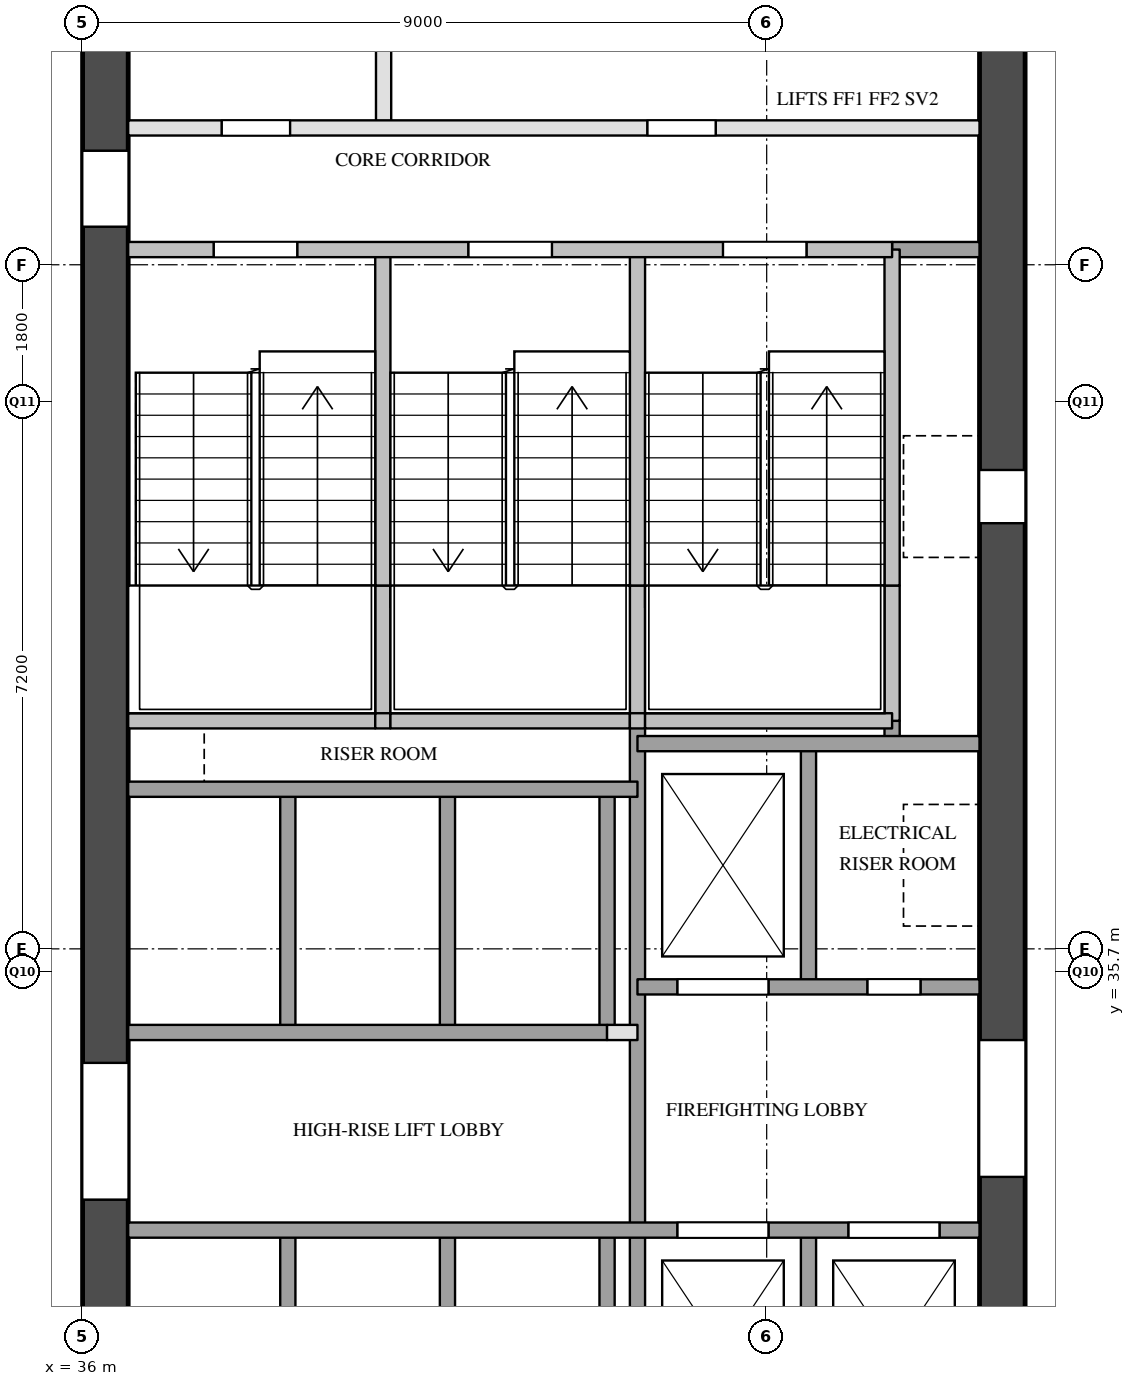
"""IFC4 building model, lengths in metres.
Left out: names, types, materials, properties, quantities, classifications, styles, units other than length and angle.
Written with IfcOpenShell. Run it as: python <this file> out.ifc"""

import sys

from ifc_helpers import new_model, si_unit, direction, frame, frame_2d, origin, place, context, subcontext, project, spatial, rectangle, extrude, element, fill, save


model = new_model("IFC4")
c1 = context("Model", 3, precision=1e-05, world=origin(), true_north=direction((0.0, 1.0)))
c2 = subcontext(c1, "Body", "Model", "MODEL_VIEW")
j1 = project(units=[si_unit("LENGTHUNIT", "METRE"), si_unit("PLANEANGLEUNIT", "RADIAN")], contexts=[c1])
p1 = place(None, origin())
s1 = spatial("IfcSite", under=j1, at=p1, CompositionType="ELEMENT")
p2 = place(p1, origin())
s2 = spatial("IfcBuilding", under=s1, at=p2, CompositionType="ELEMENT")
p3 = place(p2, frame((0.0, 0.0, 38.6)))
s3 = spatial("IfcBuildingStorey", under=s2, at=p3, CompositionType="ELEMENT", Elevation=38.6)
p4 = place(p3, frame((36.3, 29.1, 0.0), z_axis=(0.0, 0.0, 1.0), x_axis=(0.0, 1.0, 0.0)))
e1 = element("IfcWall", 1, at=p4, inside=s3, PredefinedType="SHEAR", context=c2, shape_type="SweptSolid", body=[
    extrude(rectangle(XDim=20.3, YDim=0.6, at=frame_2d((10.15, 0.0))), origin(), (0.0, 0.0, 1.0), 3.5),
])
p5 = place(p4, frame((3.6, 0.0, 0.0)))
e2 = element("IfcOpeningElement", 2, at=p5, cuts=e1, PredefinedType="OPENING", context=c2, shape_type="SweptSolid", body=[
    extrude(rectangle(XDim=1.8, YDim=2.1, at=frame_2d((0.9, 1.05))), frame((0.0, 0.31, 0.0), z_axis=(0.0, -1.0, 0.0), x_axis=(1.0, 0.0, 0.0)), (0.0, 0.0, 1.0), 0.62),
])
p6 = place(p4, frame((16.4, 0.0, 0.0)))
e3 = element("IfcOpeningElement", 3, at=p6, cuts=e1, PredefinedType="OPENING", context=c2, shape_type="SweptSolid", body=[
    extrude(rectangle(XDim=1.0, YDim=2.1, at=frame_2d((0.5, 1.05))), frame((0.0, 0.31, 0.0), z_axis=(0.0, -1.0, 0.0), x_axis=(1.0, 0.0, 0.0)), (0.0, 0.0, 1.0), 0.62),
])
p7 = place(p3, frame((48.1, 29.1, 0.0), z_axis=(0.0, 0.0, 1.0), x_axis=(0.0, 1.0, 0.0)))
e4 = element("IfcWall", 4, at=p7, inside=s3, PredefinedType="SHEAR", context=c2, shape_type="SweptSolid", body=[
    extrude(rectangle(XDim=20.3, YDim=0.6, at=frame_2d((10.15, 0.0))), origin(), (0.0, 0.0, 1.0), 3.5),
])
p8 = place(p7, frame((12.5, 0.0, 0.0)))
e5 = element("IfcOpeningElement", 5, at=p8, cuts=e4, PredefinedType="OPENING", context=c2, shape_type="SweptSolid", body=[
    extrude(rectangle(XDim=0.7, YDim=2.1, at=frame_2d((0.35, 1.05))), frame((0.0, 0.31, 0.0), z_axis=(0.0, -1.0, 0.0), x_axis=(1.0, 0.0, 0.0)), (0.0, 0.0, 1.0), 0.62),
])
p9 = place(p7, frame((3.9, 0.0, 0.0)))
e6 = element("IfcOpeningElement", 6, at=p9, cuts=e4, PredefinedType="OPENING", context=c2, shape_type="SweptSolid", body=[
    extrude(rectangle(XDim=1.8, YDim=2.1, at=frame_2d((0.9, 1.05))), frame((0.0, 0.31, 0.0), z_axis=(0.0, -1.0, 0.0), x_axis=(1.0, 0.0, 0.0)), (0.0, 0.0, 1.0), 0.62),
])
p10 = place(p3, frame((38.7, 29.1, 0.0), z_axis=(0.0, 0.0, 1.0), x_axis=(0.0, 1.0, 0.0)))
e7 = element("IfcWall", 7, at=p10, inside=s3, PredefinedType="SOLIDWALL", context=c2, shape_type="SweptSolid", body=[
    extrude(rectangle(XDim=3.2, YDim=0.2, at=frame_2d((1.6, 0.0))), origin(), (0.0, 0.0, 1.0), 3.5),
])
p11 = place(p3, frame((38.7, 34.9, 0.0), z_axis=(0.0, 0.0, 1.0), x_axis=(0.0, 1.0, 0.0)))
e8 = element("IfcWall", 8, at=p11, inside=s3, PredefinedType="SOLIDWALL", context=c2, shape_type="SweptSolid", body=[
    extrude(rectangle(XDim=3.2, YDim=0.2, at=frame_2d((1.6, 0.0))), origin(), (0.0, 0.0, 1.0), 3.5),
])
p12 = place(p3, frame((39.95, 39.0, 0.0), z_axis=(0.0, 0.0, 1.0), x_axis=(0.0, 1.0, 0.0)))
e9 = element("IfcWall", 9, at=p12, inside=s3, PredefinedType="SOLIDWALL", context=c2, shape_type="SweptSolid", body=[
    extrude(rectangle(XDim=1.78, YDim=0.2, at=frame_2d((0.89, 0.0))), origin(), (0.0, 0.0, 1.0), 3.5),
])
p13 = place(p3, frame((39.95, 40.78, 0.0), z_axis=(0.0, 0.0, 1.0), x_axis=(0.0, 1.0, 0.0)))
e10 = element("IfcWall", 10, at=p13, inside=s3, PredefinedType="SOLIDWALL", context=c2, shape_type="SweptSolid", body=[
    extrude(rectangle(XDim=4.42, YDim=0.2, at=frame_2d((2.21, 0.0))), origin(), (0.0, 0.0, 1.0), 3.5),
])
p14 = place(p3, frame((39.96, 46.8, 0.0), z_axis=(0.0, 0.0, 1.0), x_axis=(0.0, 1.0, 0.0)))
e11 = element("IfcWall", 11, at=p14, inside=s3, PredefinedType="PARTITIONING", context=c2, shape_type="SweptSolid", body=[
    extrude(rectangle(XDim=2.2, YDim=0.2, at=frame_2d((1.1, 0.0))), origin(), (0.0, 0.0, 1.0), 3.5),
])
p15 = place(p3, frame((40.8, 29.1, 0.0), z_axis=(0.0, 0.0, 1.0), x_axis=(0.0, 1.0, 0.0)))
e12 = element("IfcWall", 12, at=p15, inside=s3, PredefinedType="SOLIDWALL", context=c2, shape_type="SweptSolid", body=[
    extrude(rectangle(XDim=3.2, YDim=0.2, at=frame_2d((1.6, 0.0))), origin(), (0.0, 0.0, 1.0), 3.5),
])
p16 = place(p3, frame((40.8, 34.9, 0.0), z_axis=(0.0, 0.0, 1.0), x_axis=(0.0, 1.0, 0.0)))
e13 = element("IfcWall", 13, at=p16, inside=s3, PredefinedType="SOLIDWALL", context=c2, shape_type="SweptSolid", body=[
    extrude(rectangle(XDim=3.2, YDim=0.2, at=frame_2d((1.6, 0.0))), origin(), (0.0, 0.0, 1.0), 3.5),
])
p17 = place(p3, frame((42.9, 29.1, 0.0), z_axis=(0.0, 0.0, 1.0), x_axis=(0.0, 1.0, 0.0)))
e14 = element("IfcWall", 14, at=p17, inside=s3, PredefinedType="SOLIDWALL", context=c2, shape_type="SweptSolid", body=[
    extrude(rectangle(XDim=3.2, YDim=0.2, at=frame_2d((1.6, 0.0))), origin(), (0.0, 0.0, 1.0), 3.5),
])
p18 = place(p3, frame((42.9, 34.9, 0.0), z_axis=(0.0, 0.0, 1.0), x_axis=(0.0, 1.0, 0.0)))
e15 = element("IfcWall", 15, at=p18, inside=s3, PredefinedType="SOLIDWALL", context=c2, shape_type="SweptSolid", body=[
    extrude(rectangle(XDim=3.2, YDim=0.2, at=frame_2d((1.6, 0.0))), origin(), (0.0, 0.0, 1.0), 3.5),
])
p19 = place(p3, frame((43.3, 29.1, 0.0), z_axis=(0.0, 0.0, 1.0), x_axis=(0.0, 1.0, 0.0)))
e16 = element("IfcWall", 16, at=p19, inside=s3, PredefinedType="SOLIDWALL", context=c2, shape_type="SweptSolid", body=[
    extrude(rectangle(XDim=9.9, YDim=0.2, at=frame_2d((4.95, 0.0))), origin(), (0.0, 0.0, 1.0), 3.5),
])
p20 = place(p3, frame((43.3, 39.0, 0.0), z_axis=(0.0, 0.0, 1.0), x_axis=(0.0, 1.0, 0.0)))
e17 = element("IfcWall", 17, at=p20, inside=s3, PredefinedType="SOLIDWALL", context=c2, shape_type="SweptSolid", body=[
    extrude(rectangle(XDim=1.78, YDim=0.2, at=frame_2d((0.89, 0.0))), origin(), (0.0, 0.0, 1.0), 3.5),
])
p21 = place(p3, frame((43.3, 40.78, 0.0), z_axis=(0.0, 0.0, 1.0), x_axis=(0.0, 1.0, 0.0)))
e18 = element("IfcWall", 18, at=p21, inside=s3, PredefinedType="SOLIDWALL", context=c2, shape_type="SweptSolid", body=[
    extrude(rectangle(XDim=4.42, YDim=0.2, at=frame_2d((2.21, 0.0))), origin(), (0.0, 0.0, 1.0), 3.5),
])
for number, where, z_axis, x_axis in (
    (19, (45.55, 29.1, 0.0), (0.0, 0.0, 1.0), (0.0, 1.0, 0.0)),
    (20, (45.55, 35.5, 0.0), (0.0, 0.0, 1.0), (0.0, 1.0, 0.0)),
):
    element("IfcWall", number, at=place(p3, frame(where, z_axis=z_axis, x_axis=x_axis)), inside=s3, PredefinedType="SOLIDWALL", context=c2, shape_type="SweptSolid", body=[
        extrude(rectangle(XDim=3.2, YDim=0.2, at=frame_2d((1.6, 0.0))), origin(), (0.0, 0.0, 1.0), 3.5),
    ])
p22 = place(p3, frame((46.65, 38.7, 0.0), z_axis=(0.0, 0.0, 1.0), x_axis=(0.0, 1.0, 0.0)))
e21 = element("IfcWall", 21, at=p22, inside=s3, PredefinedType="SOLIDWALL", context=c2, shape_type="SweptSolid", body=[
    extrude(rectangle(XDim=0.3, YDim=0.2, at=frame_2d((0.15, 0.0))), origin(), (0.0, 0.0, 1.0), 3.5),
])
p23 = place(p3, frame((46.65, 39.0, 0.0), z_axis=(0.0, 0.0, 1.0), x_axis=(0.0, 1.0, 0.0)))
e22 = element("IfcWall", 22, at=p23, inside=s3, PredefinedType="SOLIDWALL", context=c2, shape_type="SweptSolid", body=[
    extrude(rectangle(XDim=1.78, YDim=0.2, at=frame_2d((0.89, 0.0))), origin(), (0.0, 0.0, 1.0), 3.5),
])
p24 = place(p3, frame((46.65, 40.78, 0.0), z_axis=(0.0, 0.0, 1.0), x_axis=(0.0, 1.0, 0.0)))
e23 = element("IfcWall", 23, at=p24, inside=s3, PredefinedType="SOLIDWALL", context=c2, shape_type="SweptSolid", body=[
    extrude(rectangle(XDim=4.42, YDim=0.2, at=frame_2d((2.21, 0.0))), origin(), (0.0, 0.0, 1.0), 3.5),
])
p25 = place(p3, frame((36.6, 32.3, 0.0), z_axis=(0.0, 0.0, 1.0), x_axis=(1.0, 0.0, 0.0)))
e24 = element("IfcWall", 24, at=p25, inside=s3, PredefinedType="SOLIDWALL", context=c2, shape_type="SweptSolid", body=[
    extrude(rectangle(XDim=11.2, YDim=0.2, at=frame_2d((5.6, 0.0))), origin(), (0.0, 0.0, 1.0), 3.5),
])
p26 = place(p25, frame((7.225, 0.0, 0.0)))
e25 = element("IfcOpeningElement", 25, at=p26, cuts=e24, PredefinedType="OPENING", context=c2, shape_type="SweptSolid", body=[
    extrude(rectangle(XDim=1.2, YDim=2.1, at=frame_2d((0.6, 1.05))), frame((0.0, 0.11, 0.0), z_axis=(0.0, -1.0, 0.0), x_axis=(1.0, 0.0, 0.0)), (0.0, 0.0, 1.0), 0.22),
])
p27 = place(p25, frame((9.475, 0.0, 0.0)))
e26 = element("IfcOpeningElement", 26, at=p27, cuts=e24, PredefinedType="OPENING", context=c2, shape_type="SweptSolid", body=[
    extrude(rectangle(XDim=1.2, YDim=2.1, at=frame_2d((0.6, 1.05))), frame((0.0, 0.11, 0.0), z_axis=(0.0, -1.0, 0.0), x_axis=(1.0, 0.0, 0.0)), (0.0, 0.0, 1.0), 0.22),
])
p28 = place(p3, frame((42.9, 34.9, 0.0), z_axis=(0.0, 0.0, 1.0), x_axis=(1.0, 0.0, 0.0)))
e27 = element("IfcWall", 27, at=p28, inside=s3, PredefinedType="PARTITIONING", context=c2, shape_type="SweptSolid", body=[
    extrude(rectangle(XDim=0.4, YDim=0.2, at=frame_2d((0.2, 0.0))), origin(), (0.0, 0.0, 1.0), 3.5),
])
p29 = place(p3, frame((36.6, 34.9, 0.0), z_axis=(0.0, 0.0, 1.0), x_axis=(1.0, 0.0, 0.0)))
e28 = element("IfcWall", 28, at=p29, inside=s3, PredefinedType="SOLIDWALL", context=c2, shape_type="SweptSolid", body=[
    extrude(rectangle(XDim=6.3, YDim=0.2, at=frame_2d((3.15, 0.0))), origin(), (0.0, 0.0, 1.0), 3.5),
])
p30 = place(p3, frame((43.3, 35.5, 0.0), z_axis=(0.0, 0.0, 1.0), x_axis=(1.0, 0.0, 0.0)))
e29 = element("IfcWall", 29, at=p30, inside=s3, PredefinedType="SOLIDWALL", context=c2, shape_type="SweptSolid", body=[
    extrude(rectangle(XDim=4.5, YDim=0.2, at=frame_2d((2.25, 0.0))), origin(), (0.0, 0.0, 1.0), 3.5),
])
p31 = place(p30, frame((0.525, 0.0, 0.0)))
e30 = element("IfcOpeningElement", 30, at=p31, cuts=e29, PredefinedType="OPENING", context=c2, shape_type="SweptSolid", body=[
    extrude(rectangle(XDim=1.2, YDim=2.1, at=frame_2d((0.6, 1.05))), frame((0.0, 0.11, 0.0), z_axis=(0.0, -1.0, 0.0), x_axis=(1.0, 0.0, 0.0)), (0.0, 0.0, 1.0), 0.22),
])
p32 = place(p30, frame((3.025, 0.0, 0.0)))
e31 = element("IfcOpeningElement", 31, at=p32, cuts=e29, PredefinedType="OPENING", context=c2, shape_type="SweptSolid", body=[
    extrude(rectangle(XDim=0.7, YDim=2.1, at=frame_2d((0.35, 1.05))), frame((0.0, 0.11, 0.0), z_axis=(0.0, -1.0, 0.0), x_axis=(1.0, 0.0, 0.0)), (0.0, 0.0, 1.0), 0.22),
])
p33 = place(p3, frame((36.6, 38.1, 0.0), z_axis=(0.0, 0.0, 1.0), x_axis=(1.0, 0.0, 0.0)))
e32 = element("IfcWall", 32, at=p33, inside=s3, PredefinedType="SOLIDWALL", context=c2, shape_type="SweptSolid", body=[
    extrude(rectangle(XDim=6.7, YDim=0.2, at=frame_2d((3.35, 0.0))), origin(), (0.0, 0.0, 1.0), 3.5),
])
p34 = place(p3, frame((43.3, 38.7, 0.0), z_axis=(0.0, 0.0, 1.0), x_axis=(1.0, 0.0, 0.0)))
e33 = element("IfcWall", 33, at=p34, inside=s3, PredefinedType="SOLIDWALL", context=c2, shape_type="SweptSolid", body=[
    extrude(rectangle(XDim=4.5, YDim=0.2, at=frame_2d((2.25, 0.0))), origin(), (0.0, 0.0, 1.0), 3.5),
])
p35 = place(p3, frame((36.6, 39.0, 0.0), z_axis=(0.0, 0.0, 1.0), x_axis=(1.0, 0.0, 0.0)))
e34 = element("IfcWall", 34, at=p35, inside=s3, PredefinedType="SOLIDWALL", context=c2, shape_type="SweptSolid", body=[
    extrude(rectangle(XDim=3.25, YDim=0.2, at=frame_2d((1.625, 0.0))), origin(), (0.0, 0.0, 1.0), 3.5),
])
p36 = place(p3, frame((39.85, 39.0, 0.0), z_axis=(0.0, 0.0, 1.0), x_axis=(1.0, 0.0, 0.0)))
e35 = element("IfcWall", 35, at=p36, inside=s3, PredefinedType="SOLIDWALL", context=c2, shape_type="SweptSolid", body=[
    extrude(rectangle(XDim=0.2, YDim=0.2, at=frame_2d((0.1, 0.0))), origin(), (0.0, 0.0, 1.0), 3.5),
])
p37 = place(p3, frame((40.05, 39.0, 0.0), z_axis=(0.0, 0.0, 1.0), x_axis=(1.0, 0.0, 0.0)))
e36 = element("IfcWall", 36, at=p37, inside=s3, PredefinedType="SOLIDWALL", context=c2, shape_type="SweptSolid", body=[
    extrude(rectangle(XDim=3.15, YDim=0.2, at=frame_2d((1.575, 0.0))), origin(), (0.0, 0.0, 1.0), 3.5),
])
p38 = place(p3, frame((43.2, 39.0, 0.0), z_axis=(0.0, 0.0, 1.0), x_axis=(1.0, 0.0, 0.0)))
e37 = element("IfcWall", 37, at=p38, inside=s3, PredefinedType="SOLIDWALL", context=c2, shape_type="SweptSolid", body=[
    extrude(rectangle(XDim=0.2, YDim=0.2, at=frame_2d((0.1, 0.0))), origin(), (0.0, 0.0, 1.0), 3.5),
])
p39 = place(p3, frame((43.4, 39.0, 0.0), z_axis=(0.0, 0.0, 1.0), x_axis=(1.0, 0.0, 0.0)))
e38 = element("IfcWall", 38, at=p39, inside=s3, PredefinedType="SOLIDWALL", context=c2, shape_type="SweptSolid", body=[
    extrude(rectangle(XDim=3.25, YDim=0.2, at=frame_2d((1.625, 0.0))), origin(), (0.0, 0.0, 1.0), 3.5),
])
p40 = place(p3, frame((46.65, 45.2, 0.0), z_axis=(0.0, 0.0, 1.0), x_axis=(1.0, 0.0, 0.0)))
e39 = element("IfcWall", 39, at=p40, inside=s3, PredefinedType="SOLIDWALL", context=c2, shape_type="SweptSolid", body=[
    extrude(rectangle(XDim=1.15, YDim=0.2, at=frame_2d((0.575, 0.0))), origin(), (0.0, 0.0, 1.0), 3.5),
])
p41 = place(p3, frame((36.6, 45.2, 0.0), z_axis=(0.0, 0.0, 1.0), x_axis=(1.0, 0.0, 0.0)))
e40 = element("IfcWall", 40, at=p41, inside=s3, PredefinedType="SOLIDWALL", context=c2, shape_type="SweptSolid", body=[
    extrude(rectangle(XDim=10.05, YDim=0.2, at=frame_2d((5.025, 0.0))), origin(), (0.0, 0.0, 1.0), 3.5),
])
p42 = place(p41, frame((1.125, 0.0, 0.0)))
e41 = element("IfcOpeningElement", 41, at=p42, cuts=e40, PredefinedType="OPENING", context=c2, shape_type="SweptSolid", body=[
    extrude(rectangle(XDim=1.1, YDim=2.1, at=frame_2d((0.55, 1.05))), frame((0.0, 0.11, 0.0), z_axis=(0.0, -1.0, 0.0), x_axis=(1.0, 0.0, 0.0)), (0.0, 0.0, 1.0), 0.22),
])
p43 = place(p41, frame((4.475, 0.0, 0.0)))
e42 = element("IfcOpeningElement", 42, at=p43, cuts=e40, PredefinedType="OPENING", context=c2, shape_type="SweptSolid", body=[
    extrude(rectangle(XDim=1.1, YDim=2.1, at=frame_2d((0.55, 1.05))), frame((0.0, 0.11, 0.0), z_axis=(0.0, -1.0, 0.0), x_axis=(1.0, 0.0, 0.0)), (0.0, 0.0, 1.0), 0.22),
])
p44 = place(p41, frame((7.825, 0.0, 0.0)))
e43 = element("IfcOpeningElement", 43, at=p44, cuts=e40, PredefinedType="OPENING", context=c2, shape_type="SweptSolid", body=[
    extrude(rectangle(XDim=1.1, YDim=2.1, at=frame_2d((0.55, 1.05))), frame((0.0, 0.11, 0.0), z_axis=(0.0, -1.0, 0.0), x_axis=(1.0, 0.0, 0.0)), (0.0, 0.0, 1.0), 0.22),
])
p45 = place(p3, frame((36.6, 46.8, 0.0), z_axis=(0.0, 0.0, 1.0), x_axis=(1.0, 0.0, 0.0)))
e44 = element("IfcWall", 44, at=p45, inside=s3, PredefinedType="PARTITIONING", context=c2, shape_type="SweptSolid", body=[
    extrude(rectangle(XDim=11.2, YDim=0.2, at=frame_2d((5.6, 0.0))), origin(), (0.0, 0.0, 1.0), 3.5),
])
p46 = place(p45, frame((1.23, 0.0, 0.0)))
e45 = element("IfcOpeningElement", 45, at=p46, cuts=e44, PredefinedType="OPENING", context=c2, shape_type="SweptSolid", body=[
    extrude(rectangle(XDim=0.9, YDim=2.1, at=frame_2d((0.45, 1.05))), frame((0.0, 0.11, 0.0), z_axis=(0.0, -1.0, 0.0), x_axis=(1.0, 0.0, 0.0)), (0.0, 0.0, 1.0), 0.22),
])
p47 = place(p45, frame((6.83, 0.0, 0.0)))
e46 = element("IfcOpeningElement", 46, at=p47, cuts=e44, PredefinedType="OPENING", context=c2, shape_type="SweptSolid", body=[
    extrude(rectangle(XDim=0.9, YDim=2.1, at=frame_2d((0.45, 1.05))), frame((0.0, 0.11, 0.0), z_axis=(0.0, -1.0, 0.0), x_axis=(1.0, 0.0, 0.0)), (0.0, 0.0, 1.0), 0.22),
])
p48 = place(p26, origin())
e47 = element("IfcDoor", 47, at=p48, inside=s3, OperationType="SLIDING_TO_LEFT", PredefinedType="DOOR", context=c2, shape_type="SweptSolid", body=[
    extrude(rectangle(XDim=1.2, YDim=2.1, at=frame_2d((0.6, 1.05))), frame((0.0, 0.025, 0.0), z_axis=(0.0, -1.0, 0.0), x_axis=(1.0, 0.0, 0.0)), (0.0, 0.0, 1.0), 0.05),
])
fill(e25, e47)
p49 = place(p27, origin())
e48 = element("IfcDoor", 48, at=p49, inside=s3, OperationType="SLIDING_TO_LEFT", PredefinedType="DOOR", context=c2, shape_type="SweptSolid", body=[
    extrude(rectangle(XDim=1.2, YDim=2.1, at=frame_2d((0.6, 1.05))), frame((0.0, 0.025, 0.0), z_axis=(0.0, -1.0, 0.0), x_axis=(1.0, 0.0, 0.0)), (0.0, 0.0, 1.0), 0.05),
])
fill(e26, e48)
p50 = place(p31, origin())
e49 = element("IfcDoor", 49, at=p50, inside=s3, OperationType="SLIDING_TO_LEFT", PredefinedType="DOOR", context=c2, shape_type="SweptSolid", body=[
    extrude(rectangle(XDim=1.2, YDim=2.1, at=frame_2d((0.6, 1.05))), frame((0.0, 0.025, 0.0), z_axis=(0.0, -1.0, 0.0), x_axis=(1.0, 0.0, 0.0)), (0.0, 0.0, 1.0), 0.05),
])
fill(e30, e49)
p51 = place(p5, origin())
e50 = element("IfcDoor", 50, at=p51, inside=s3, OperationType="DOUBLE_DOOR_SINGLE_SWING", PredefinedType="DOOR", context=c2, shape_type="SweptSolid", body=[
    extrude(rectangle(XDim=1.8, YDim=2.1, at=frame_2d((0.9, 1.05))), frame((0.0, 0.025, 0.0), z_axis=(0.0, -1.0, 0.0), x_axis=(1.0, 0.0, 0.0)), (0.0, 0.0, 1.0), 0.05),
])
fill(e2, e50)
p52 = place(p42, origin())
e51 = element("IfcDoor", 51, at=p52, inside=s3, OperationType="SINGLE_SWING_LEFT", PredefinedType="DOOR", context=c2, shape_type="SweptSolid", body=[
    extrude(rectangle(XDim=1.1, YDim=2.1, at=frame_2d((0.55, 1.05))), frame((0.0, 0.025, 0.0), z_axis=(0.0, -1.0, 0.0), x_axis=(1.0, 0.0, 0.0)), (0.0, 0.0, 1.0), 0.05),
])
fill(e41, e51)
p53 = place(p43, origin())
e52 = element("IfcDoor", 52, at=p53, inside=s3, OperationType="SINGLE_SWING_RIGHT", PredefinedType="DOOR", context=c2, shape_type="SweptSolid", body=[
    extrude(rectangle(XDim=1.1, YDim=2.1, at=frame_2d((0.55, 1.05))), frame((0.0, 0.025, 0.0), z_axis=(0.0, -1.0, 0.0), x_axis=(1.0, 0.0, 0.0)), (0.0, 0.0, 1.0), 0.05),
])
fill(e42, e52)
p54 = place(p44, origin())
e53 = element("IfcDoor", 53, at=p54, inside=s3, OperationType="SINGLE_SWING_RIGHT", PredefinedType="DOOR", context=c2, shape_type="SweptSolid", body=[
    extrude(rectangle(XDim=1.1, YDim=2.1, at=frame_2d((0.55, 1.05))), frame((0.0, 0.025, 0.0), z_axis=(0.0, -1.0, 0.0), x_axis=(1.0, 0.0, 0.0)), (0.0, 0.0, 1.0), 0.05),
])
fill(e43, e53)
p55 = place(p8, origin())
e54 = element("IfcDoor", 54, at=p55, inside=s3, OperationType="SINGLE_SWING_RIGHT", PredefinedType="DOOR", context=c2, shape_type="SweptSolid", body=[
    extrude(rectangle(XDim=0.7, YDim=2.1, at=frame_2d((0.35, 1.05))), frame((0.0, 0.025, 0.0), z_axis=(0.0, -1.0, 0.0), x_axis=(1.0, 0.0, 0.0)), (0.0, 0.0, 1.0), 0.05),
])
fill(e5, e54)
p56 = place(p9, origin())
e55 = element("IfcDoor", 55, at=p56, inside=s3, OperationType="DOUBLE_DOOR_SINGLE_SWING", PredefinedType="DOOR", context=c2, shape_type="SweptSolid", body=[
    extrude(rectangle(XDim=1.8, YDim=2.1, at=frame_2d((0.9, 1.05))), frame((0.0, 0.025, 0.0), z_axis=(0.0, -1.0, 0.0), x_axis=(1.0, 0.0, 0.0)), (0.0, 0.0, 1.0), 0.05),
])
fill(e6, e55)
p57 = place(p32, origin())
e56 = element("IfcDoor", 56, at=p57, inside=s3, OperationType="SINGLE_SWING_RIGHT", PredefinedType="DOOR", context=c2, shape_type="SweptSolid", body=[
    extrude(rectangle(XDim=0.7, YDim=2.1, at=frame_2d((0.35, 1.05))), frame((0.0, 0.025, 0.0), z_axis=(0.0, -1.0, 0.0), x_axis=(1.0, 0.0, 0.0)), (0.0, 0.0, 1.0), 0.05),
])
fill(e31, e56)
p58 = place(p6, origin())
e57 = element("IfcDoor", 57, at=p58, inside=s3, OperationType="SINGLE_SWING_RIGHT", PredefinedType="DOOR", context=c2, shape_type="SweptSolid", body=[
    extrude(rectangle(XDim=1.0, YDim=2.1, at=frame_2d((0.5, 1.05))), frame((0.0, 0.025, 0.0), z_axis=(0.0, -1.0, 0.0), x_axis=(1.0, 0.0, 0.0)), (0.0, 0.0, 1.0), 0.05),
])
fill(e3, e57)
p59 = place(p46, origin())
e58 = element("IfcDoor", 58, at=p59, inside=s3, OperationType="SINGLE_SWING_LEFT", PredefinedType="DOOR", context=c2, shape_type="SweptSolid", body=[
    extrude(rectangle(XDim=0.9, YDim=2.1, at=frame_2d((0.45, 1.05))), frame((0.0, 0.025, 0.0), z_axis=(0.0, -1.0, 0.0), x_axis=(1.0, 0.0, 0.0)), (0.0, 0.0, 1.0), 0.05),
])
fill(e45, e58)
p60 = place(p47, origin())
e59 = element("IfcDoor", 59, at=p60, inside=s3, OperationType="SINGLE_SWING_RIGHT", PredefinedType="DOOR", context=c2, shape_type="SweptSolid", body=[
    extrude(rectangle(XDim=0.9, YDim=2.1, at=frame_2d((0.45, 1.05))), frame((0.0, 0.025, 0.0), z_axis=(0.0, -1.0, 0.0), x_axis=(1.0, 0.0, 0.0)), (0.0, 0.0, 1.0), 0.05),
])
fill(e46, e59)
save(model, sys.argv[1])
